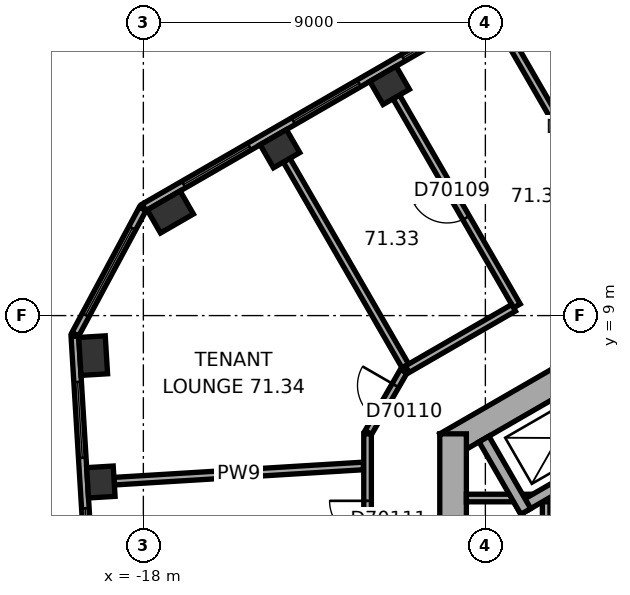
"""IFC4 building model, lengths in metres.
Left out: names, types, materials, properties, quantities, classifications, styles, units other than length and angle.
Written with IfcOpenShell. Run it as: python <this file> out.ifc"""

import sys

from ifc_helpers import new_model, si_unit, direction, frame, frame_2d, origin, origin_2d, place, context, subcontext, project, spatial, rectangle, extrude, element, fill, save


model = new_model("IFC4")
c1 = context("Model", 3, precision=1e-05, world=origin(), true_north=direction((0.0, 1.0)))
c2 = subcontext(c1, "Body", "Model", "MODEL_VIEW")
j1 = project(units=[si_unit("LENGTHUNIT", "METRE"), si_unit("PLANEANGLEUNIT", "RADIAN")], contexts=[c1])
p1 = place(None, origin())
s1 = spatial("IfcSite", under=j1, at=p1, CompositionType="ELEMENT")
p2 = place(p1, origin())
s2 = spatial("IfcBuilding", under=s1, at=p2, CompositionType="ELEMENT")
p3 = place(p2, frame((0.0, 0.0, 289.4)))
s3 = spatial("IfcBuildingStorey", under=s2, at=p3, CompositionType="ELEMENT", Elevation=289.4)
for number, where, z_axis, x_axis in (
    (1, (-11.52, 15.057, 0.0), (0.0, 0.0, 1.0), (-0.866, -0.5, 0.0)),
    (2, (-14.406, 13.391, 0.0), (0.0, 0.0, 1.0), (-0.866, -0.5, 0.0)),
):
    element("IfcColumn", number, at=place(p3, frame(where, z_axis=z_axis, x_axis=x_axis)), inside=s3, PredefinedType="COLUMN", context=c2, shape_type="SweptSolid", body=[
        extrude(rectangle(XDim=0.8, YDim=0.7, at=origin_2d()), origin(), (0.0, 0.0, 1.0), 3.7),
    ])
for number, where, z_axis, x_axis in (
    (3, (-17.291, 11.726, 0.0), (0.0, 0.0, 1.0), (-0.866, -0.5, 0.0)),
    (4, (-19.321, 7.947, 0.0), (0.0, 0.0, 1.0), (0.061, -0.998, 0.0)),
):
    element("IfcColumn", number, at=place(p3, frame(where, z_axis=z_axis, x_axis=x_axis)), inside=s3, PredefinedType="COLUMN", context=c2, shape_type="SweptSolid", body=[
        extrude(rectangle(XDim=1.0, YDim=0.7, at=origin_2d()), origin(), (0.0, 0.0, 1.0), 3.7),
    ])
p4 = place(p3, frame((-19.118, 4.621, 0.0), z_axis=(0.0, 0.0, 1.0), x_axis=(0.061048539535, -0.998134798422, 0.0)))
e5 = element("IfcColumn", 5, at=p4, inside=s3, PredefinedType="COLUMN", context=c2, shape_type="SweptSolid", body=[
    extrude(rectangle(XDim=0.8, YDim=0.7, at=origin_2d()), origin(), (0.0, 0.0, 1.0), 3.7),
])
p5 = place(p3, frame((0.175, 11.475, 0.0), z_axis=(0.0, 0.0, 1.0), x_axis=(-0.866026453023, -0.499998182661, 0.0)))
e6 = element("IfcWall", 6, at=p5, inside=s3, PredefinedType="SHEAR", context=c2, shape_type="SweptSolid", body=[
    extrude(rectangle(XDim=11.778, YDim=0.7, at=frame_2d((5.889, 0.0))), origin(), (0.0, 0.0, 1.0), 3.7),
])
p6 = place(p5, frame((6.089, 0.0, 0.0)))
e7 = element("IfcOpeningElement", 7, at=p6, cuts=e6, PredefinedType="OPENING", context=c2, shape_type="SweptSolid", body=[
    extrude(rectangle(XDim=1.5, YDim=2.1, at=frame_2d((0.75, 1.05))), frame((0.0, 0.36, 0.0), z_axis=(0.0, -1.0, 0.0), x_axis=(1.0, 0.0, 0.0)), (0.0, 0.0, 1.0), 0.72),
])
p7 = place(p5, frame((2.939, 0.0, 0.0)))
e8 = element("IfcOpeningElement", 8, at=p7, cuts=e6, PredefinedType="OPENING", context=c2, shape_type="SweptSolid", body=[
    extrude(rectangle(XDim=0.9, YDim=2.1, at=frame_2d((0.45, 1.05))), frame((0.0, 0.36, 0.0), z_axis=(0.0, -1.0, 0.0), x_axis=(1.0, 0.0, 0.0)), (0.0, 0.0, 1.0), 0.72),
])
p8 = place(p3, frame((-9.85, 5.889, 0.0), z_axis=(0.0, 0.0, 1.0), x_axis=(0.0, -1.0, 0.0)))
e9 = element("IfcWall", 9, at=p8, inside=s3, PredefinedType="SHEAR", context=c2, shape_type="SweptSolid", body=[
    extrude(rectangle(XDim=11.778, YDim=0.7, at=frame_2d((5.889, 0.0))), origin(), (0.0, 0.0, 1.0), 3.7),
])
p9 = place(p8, frame((5.039, 0.0, 0.0)))
e10 = element("IfcOpeningElement", 10, at=p9, cuts=e9, PredefinedType="OPENING", context=c2, shape_type="SweptSolid", body=[
    extrude(rectangle(XDim=1.1, YDim=2.1, at=frame_2d((0.55, 1.05))), frame((0.0, 0.36, 0.0), z_axis=(0.0, -1.0, 0.0), x_axis=(1.0, 0.0, 0.0)), (0.0, 0.0, 1.0), 0.72),
])
p10 = place(p8, frame((7.639, 0.0, 0.0)))
e11 = element("IfcOpeningElement", 11, at=p10, cuts=e9, PredefinedType="OPENING", context=c2, shape_type="SweptSolid", body=[
    extrude(rectangle(XDim=1.1, YDim=2.1, at=frame_2d((0.55, 1.05))), frame((0.0, 0.36, 0.0), z_axis=(0.0, -1.0, 0.0), x_axis=(1.0, 0.0, 0.0)), (0.0, 0.0, 1.0), 0.72),
])
p11 = place(p3, frame((-2.624, 20.713, 0.0), z_axis=(0.0, 0.0, 1.0), x_axis=(-0.866026460444, -0.499998169808, 0.0)))
e12 = element("IfcWall", 12, at=p11, inside=s3, PredefinedType="STANDARD", context=c2, shape_type="SweptSolid", body=[
    extrude(rectangle(XDim=17.731, YDim=0.2, at=frame_2d((8.866, 0.0))), origin(), (0.0, 0.0, 1.0), 3.7),
])
p12 = place(p11, frame((1.203, 0.0, 0.9)))
e13 = element("IfcOpeningElement", 13, at=p12, cuts=e12, PredefinedType="OPENING", context=c2, shape_type="SweptSolid", body=[
    extrude(rectangle(XDim=2.0, YDim=2.0, at=frame_2d((1.0, 1.0))), frame((0.0, 0.11, 0.0), z_axis=(0.0, -1.0, 0.0), x_axis=(1.0, 0.0, 0.0)), (0.0, 0.0, 1.0), 0.22),
])
p13 = place(p11, frame((4.535, 0.0, 0.9)))
e14 = element("IfcOpeningElement", 14, at=p13, cuts=e12, PredefinedType="OPENING", context=c2, shape_type="SweptSolid", body=[
    extrude(rectangle(XDim=2.0, YDim=2.0, at=frame_2d((1.0, 1.0))), frame((0.0, 0.11, 0.0), z_axis=(0.0, -1.0, 0.0), x_axis=(1.0, 0.0, 0.0)), (0.0, 0.0, 1.0), 0.22),
])
p14 = place(p11, frame((7.867, 0.0, 0.9)))
e15 = element("IfcOpeningElement", 15, at=p14, cuts=e12, PredefinedType="OPENING", context=c2, shape_type="SweptSolid", body=[
    extrude(rectangle(XDim=2.0, YDim=2.0, at=frame_2d((1.0, 1.0))), frame((0.0, 0.11, 0.0), z_axis=(0.0, -1.0, 0.0), x_axis=(1.0, 0.0, 0.0)), (0.0, 0.0, 1.0), 0.22),
])
p15 = place(p11, frame((11.198, 0.0, 0.9)))
e16 = element("IfcOpeningElement", 16, at=p15, cuts=e12, PredefinedType="OPENING", context=c2, shape_type="SweptSolid", body=[
    extrude(rectangle(XDim=2.0, YDim=2.0, at=frame_2d((1.0, 1.0))), frame((0.0, 0.11, 0.0), z_axis=(0.0, -1.0, 0.0), x_axis=(1.0, 0.0, 0.0)), (0.0, 0.0, 1.0), 0.22),
])
p16 = place(p11, frame((14.53, 0.0, 0.9)))
e17 = element("IfcOpeningElement", 17, at=p16, cuts=e12, PredefinedType="OPENING", context=c2, shape_type="SweptSolid", body=[
    extrude(rectangle(XDim=2.0, YDim=2.0, at=frame_2d((1.0, 1.0))), frame((0.0, 0.11, 0.0), z_axis=(0.0, -1.0, 0.0), x_axis=(1.0, 0.0, 0.0)), (0.0, 0.0, 1.0), 0.22),
])
p17 = place(p3, frame((-18.018, 11.808, 0.0), z_axis=(0.0, 0.0, 1.0), x_axis=(-0.473318619185, -0.880891301315, 0.0)))
e18 = element("IfcWall", 18, at=p17, inside=s3, PredefinedType="STANDARD", context=c2, shape_type="SweptSolid", body=[
    extrude(rectangle(XDim=3.747, YDim=0.2, at=frame_2d((1.874, 0.0))), origin(), (0.0, 0.0, 1.0), 3.7),
])
p18 = place(p17, frame((0.573, 0.0, 0.9)))
e19 = element("IfcOpeningElement", 19, at=p18, cuts=e18, PredefinedType="OPENING", context=c2, shape_type="SweptSolid", body=[
    extrude(rectangle(XDim=2.6, YDim=2.0, at=frame_2d((1.3, 1.0))), frame((0.0, 0.11, 0.0), z_axis=(0.0, -1.0, 0.0), x_axis=(1.0, 0.0, 0.0)), (0.0, 0.0, 1.0), 0.22),
])
p19 = place(p3, frame((-19.803, 8.454, 0.0), z_axis=(0.0, 0.0, 1.0), x_axis=(0.061036717565, -0.998135521414, 0.0)))
e20 = element("IfcWall", 20, at=p19, inside=s3, PredefinedType="STANDARD", context=c2, shape_type="SweptSolid", body=[
    extrude(rectangle(XDim=17.731, YDim=0.2, at=frame_2d((8.866, 0.0))), origin(), (0.0, 0.0, 1.0), 3.7),
])
p20 = place(p19, frame((1.202, 0.0, 0.9)))
e21 = element("IfcOpeningElement", 21, at=p20, cuts=e20, PredefinedType="OPENING", context=c2, shape_type="SweptSolid", body=[
    extrude(rectangle(XDim=2.0, YDim=2.0, at=frame_2d((1.0, 1.0))), frame((0.0, 0.11, 0.0), z_axis=(0.0, -1.0, 0.0), x_axis=(1.0, 0.0, 0.0)), (0.0, 0.0, 1.0), 0.22),
])
p21 = place(p19, frame((4.533, 0.0, 0.9)))
e22 = element("IfcOpeningElement", 22, at=p21, cuts=e20, PredefinedType="OPENING", context=c2, shape_type="SweptSolid", body=[
    extrude(rectangle(XDim=2.0, YDim=2.0, at=frame_2d((1.0, 1.0))), frame((0.0, 0.11, 0.0), z_axis=(0.0, -1.0, 0.0), x_axis=(1.0, 0.0, 0.0)), (0.0, 0.0, 1.0), 0.22),
])
p22 = place(p19, frame((7.865, 0.0, 0.9)))
e23 = element("IfcOpeningElement", 23, at=p22, cuts=e20, PredefinedType="OPENING", context=c2, shape_type="SweptSolid", body=[
    extrude(rectangle(XDim=2.0, YDim=2.0, at=frame_2d((1.0, 1.0))), frame((0.0, 0.11, 0.0), z_axis=(0.0, -1.0, 0.0), x_axis=(1.0, 0.0, 0.0)), (0.0, 0.0, 1.0), 0.22),
])
p23 = place(p19, frame((11.197, 0.0, 0.9)))
e24 = element("IfcOpeningElement", 24, at=p23, cuts=e20, PredefinedType="OPENING", context=c2, shape_type="SweptSolid", body=[
    extrude(rectangle(XDim=2.0, YDim=2.0, at=frame_2d((1.0, 1.0))), frame((0.0, 0.11, 0.0), z_axis=(0.0, -1.0, 0.0), x_axis=(1.0, 0.0, 0.0)), (0.0, 0.0, 1.0), 0.22),
])
p24 = place(p19, frame((14.528, 0.0, 0.9)))
e25 = element("IfcOpeningElement", 25, at=p24, cuts=e20, PredefinedType="OPENING", context=c2, shape_type="SweptSolid", body=[
    extrude(rectangle(XDim=2.0, YDim=2.0, at=frame_2d((1.0, 1.0))), frame((0.0, 0.11, 0.0), z_axis=(0.0, -1.0, 0.0), x_axis=(1.0, 0.0, 0.0)), (0.0, 0.0, 1.0), 0.22),
])
p25 = place(p3, frame((-7.4, 4.3, 0.0), z_axis=(0.0, 0.0, 1.0), x_axis=(0.0, -1.0, 0.0)))
e26 = element("IfcWall", 26, at=p25, inside=s3, PredefinedType="PARTITIONING", context=c2, shape_type="SweptSolid", body=[
    extrude(rectangle(XDim=8.0, YDim=0.2, at=frame_2d((4.0, 0.0))), origin(), (0.0, 0.0, 1.0), 3.42),
])
p26 = place(p3, frame((-7.3, 4.2, 0.0), z_axis=(0.0, 0.0, 1.0), x_axis=(-1.0, 0.0, 0.0)))
e27 = element("IfcWall", 27, at=p26, inside=s3, PredefinedType="PARTITIONING", context=c2, shape_type="SweptSolid", body=[
    extrude(rectangle(XDim=2.2, YDim=0.2, at=frame_2d((1.1, 0.0))), origin(), (0.0, 0.0, 1.0), 3.42),
])
p27 = place(p3, frame((-5.24, 5.577, 0.0), z_axis=(0.0, 0.0, 1.0), x_axis=(-0.866014461049, -0.500018952895, 0.0)))
e28 = element("IfcWall", 28, at=p27, inside=s3, PredefinedType="SHEAR", context=c2, shape_type="SweptSolid", body=[
    extrude(rectangle(XDim=3.35, YDim=0.3, at=frame_2d((1.675, 0.0))), origin(), (0.0, 0.0, 1.0), 3.42),
])
p28 = place(p3, frame((-7.937, 3.847, 0.0), z_axis=(0.0, 0.0, 1.0), x_axis=(-0.50002983664, 0.866008176907, 0.0)))
e29 = element("IfcWall", 29, at=p28, inside=s3, PredefinedType="SHEAR", context=c2, shape_type="SweptSolid", body=[
    extrude(rectangle(XDim=2.2, YDim=0.3, at=frame_2d((1.1, 0.0))), origin(), (0.0, 0.0, 1.0), 3.42),
])
p29 = place(p3, frame((-18.768, 4.643, 0.0), z_axis=(0.0, 0.0, 1.0), x_axis=(0.99813496285, 0.0610458511, 0.0)))
e30 = element("IfcWall", 30, at=p29, inside=s3, PredefinedType="PARTITIONING", context=c2, shape_type="SweptSolid", body=[
    extrude(rectangle(XDim=6.571, YDim=0.2, at=frame_2d((3.285, 0.0))), origin(), (0.0, 0.0, 1.0), 3.42),
])
p30 = place(p3, frame((-14.23, 13.088, 0.0), z_axis=(0.0, 0.0, 1.0), x_axis=(0.500004234368, -0.866022959057, 0.0)))
e31 = element("IfcWall", 31, at=p30, inside=s3, PredefinedType="PARTITIONING", context=c2, shape_type="SweptSolid", body=[
    extrude(rectangle(XDim=6.25, YDim=0.2, at=frame_2d((3.125, 0.0))), origin(), (0.0, 0.0, 1.0), 3.42),
])
p31 = place(p3, frame((-12.1, 5.889, 0.0), z_axis=(0.0, 0.0, 1.0), x_axis=(0.0, -1.0, 0.0)))
e32 = element("IfcWall", 32, at=p31, inside=s3, PredefinedType="PARTITIONING", context=c2, shape_type="SweptSolid", body=[
    extrude(rectangle(XDim=3.688, YDim=0.2, at=frame_2d((1.844, 0.0))), origin(), (0.0, 0.0, 1.0), 3.42),
])
p32 = place(p31, frame((1.763, 0.0, 0.0)))
e33 = element("IfcOpeningElement", 33, at=p32, cuts=e32, PredefinedType="OPENING", context=c2, shape_type="SweptSolid", body=[
    extrude(rectangle(XDim=1.0, YDim=2.1, at=frame_2d((0.5, 1.05))), frame((0.0, 0.11, 0.0), z_axis=(0.0, -1.0, 0.0), x_axis=(1.0, 0.0, 0.0)), (0.0, 0.0, 1.0), 0.22),
])
p33 = place(p3, frame((-11.345, 14.754, 0.0), z_axis=(0.0, 0.0, 1.0), x_axis=(0.500005339912, -0.866022320763, 0.0)))
e34 = element("IfcWall", 34, at=p33, inside=s3, PredefinedType="PARTITIONING", context=c2, shape_type="SweptSolid", body=[
    extrude(rectangle(XDim=6.35, YDim=0.2, at=frame_2d((3.175, 0.0))), origin(), (0.0, 0.0, 1.0), 3.42),
])
p34 = place(p33, frame((2.675, 0.0, 0.0)))
e35 = element("IfcOpeningElement", 35, at=p34, cuts=e34, PredefinedType="OPENING", context=c2, shape_type="SweptSolid", body=[
    extrude(rectangle(XDim=1.0, YDim=2.1, at=frame_2d((0.5, 1.05))), frame((0.0, 0.11, 0.0), z_axis=(0.0, -1.0, 0.0), x_axis=(1.0, 0.0, 0.0)), (0.0, 0.0, 1.0), 0.22),
])
p35 = place(p3, frame((-11.15, 7.534, 0.0), z_axis=(0.0, 0.0, 1.0), x_axis=(-0.500063286585, -0.865988862174, 0.0)))
e36 = element("IfcWall", 36, at=p35, inside=s3, PredefinedType="PARTITIONING", context=c2, shape_type="SweptSolid", body=[
    extrude(rectangle(XDim=1.86, YDim=0.2, at=frame_2d((0.93, 0.0))), origin(), (0.0, 0.0, 1.0), 3.42),
])
p36 = place(p35, frame((0.43, 0.0, 0.0)))
e37 = element("IfcOpeningElement", 37, at=p36, cuts=e36, PredefinedType="OPENING", context=c2, shape_type="SweptSolid", body=[
    extrude(rectangle(XDim=1.0, YDim=2.1, at=frame_2d((0.5, 1.05))), frame((0.0, 0.11, 0.0), z_axis=(0.0, -1.0, 0.0), x_axis=(1.0, 0.0, 0.0)), (0.0, 0.0, 1.0), 0.22),
])
p37 = place(p3, frame((-8.46, 16.42, 0.0), z_axis=(0.0, 0.0, 1.0), x_axis=(0.500005339912, -0.866022320763, 0.0)))
e38 = element("IfcWall", 38, at=p37, inside=s3, PredefinedType="PARTITIONING", context=c2, shape_type="SweptSolid", body=[
    extrude(rectangle(XDim=6.35, YDim=0.2, at=frame_2d((3.175, 0.0))), origin(), (0.0, 0.0, 1.0), 2.87),
])
p38 = place(p37, frame((2.675, 0.0, 0.0)))
e39 = element("IfcOpeningElement", 39, at=p38, cuts=e38, PredefinedType="OPENING", context=c2, shape_type="SweptSolid", body=[
    extrude(rectangle(XDim=1.0, YDim=2.1, at=frame_2d((0.5, 1.05))), frame((0.0, 0.11, 0.0), z_axis=(0.0, -1.0, 0.0), x_axis=(1.0, 0.0, 0.0)), (0.0, 0.0, 1.0), 0.22),
])
p39 = place(p3, frame((-8.257, 9.205, 0.0), z_axis=(0.0, 0.0, 1.0), x_axis=(-0.866030838723, -0.499990586292, 0.0)))
e40 = element("IfcWall", 40, at=p39, inside=s3, PredefinedType="PARTITIONING", context=c2, shape_type="SweptSolid", body=[
    extrude(rectangle(XDim=3.231, YDim=0.2, at=frame_2d((1.616, 0.0))), origin(), (0.0, 0.0, 1.0), 3.42),
])
p40 = place(p14, origin())
e41 = element("IfcWindow", 41, at=p40, inside=s3, PartitioningType="SINGLE_PANEL", PredefinedType="WINDOW", context=c2, shape_type="SweptSolid", body=[
    extrude(rectangle(XDim=2.0, YDim=2.0, at=frame_2d((1.0, 1.0))), frame((0.0, 0.03, 0.0), z_axis=(0.0, -1.0, 0.0), x_axis=(1.0, 0.0, 0.0)), (0.0, 0.0, 1.0), 0.06),
])
fill(e15, e41)
p41 = place(p15, origin())
e42 = element("IfcWindow", 42, at=p41, inside=s3, PartitioningType="SINGLE_PANEL", PredefinedType="WINDOW", context=c2, shape_type="SweptSolid", body=[
    extrude(rectangle(XDim=2.0, YDim=2.0, at=frame_2d((1.0, 1.0))), frame((0.0, 0.03, 0.0), z_axis=(0.0, -1.0, 0.0), x_axis=(1.0, 0.0, 0.0)), (0.0, 0.0, 1.0), 0.06),
])
fill(e16, e42)
p42 = place(p16, origin())
e43 = element("IfcWindow", 43, at=p42, inside=s3, PartitioningType="SINGLE_PANEL", PredefinedType="WINDOW", context=c2, shape_type="SweptSolid", body=[
    extrude(rectangle(XDim=2.0, YDim=2.0, at=frame_2d((1.0, 1.0))), frame((0.0, 0.03, 0.0), z_axis=(0.0, -1.0, 0.0), x_axis=(1.0, 0.0, 0.0)), (0.0, 0.0, 1.0), 0.06),
])
fill(e17, e43)
p43 = place(p18, origin())
e44 = element("IfcWindow", 44, at=p43, inside=s3, PartitioningType="SINGLE_PANEL", PredefinedType="WINDOW", context=c2, shape_type="SweptSolid", body=[
    extrude(rectangle(XDim=2.6, YDim=2.0, at=frame_2d((1.3, 1.0))), frame((0.0, 0.03, 0.0), z_axis=(0.0, -1.0, 0.0), x_axis=(1.0, 0.0, 0.0)), (0.0, 0.0, 1.0), 0.06),
])
fill(e19, e44)
p44 = place(p20, origin())
e45 = element("IfcWindow", 45, at=p44, inside=s3, PartitioningType="SINGLE_PANEL", PredefinedType="WINDOW", context=c2, shape_type="SweptSolid", body=[
    extrude(rectangle(XDim=2.0, YDim=2.0, at=frame_2d((1.0, 1.0))), frame((0.0, 0.03, 0.0), z_axis=(0.0, -1.0, 0.0), x_axis=(1.0, 0.0, 0.0)), (0.0, 0.0, 1.0), 0.06),
])
fill(e21, e45)
p45 = place(p21, origin())
e46 = element("IfcWindow", 46, at=p45, inside=s3, PartitioningType="SINGLE_PANEL", PredefinedType="WINDOW", context=c2, shape_type="SweptSolid", body=[
    extrude(rectangle(XDim=2.0, YDim=2.0, at=frame_2d((1.0, 1.0))), frame((0.0, 0.03, 0.0), z_axis=(0.0, -1.0, 0.0), x_axis=(1.0, 0.0, 0.0)), (0.0, 0.0, 1.0), 0.06),
])
fill(e22, e46)
p46 = place(p34, origin())
e47 = element("IfcDoor", 47, at=p46, inside=s3, OperationType="SINGLE_SWING_LEFT", PredefinedType="DOOR", context=c2, shape_type="SweptSolid", body=[
    extrude(rectangle(XDim=1.0, YDim=2.1, at=frame_2d((0.5, 1.05))), frame((0.0, 0.025, 0.0), z_axis=(0.0, -1.0, 0.0), x_axis=(1.0, 0.0, 0.0)), (0.0, 0.0, 1.0), 0.05),
])
fill(e35, e47)
p47 = place(p36, origin())
e48 = element("IfcDoor", 48, at=p47, inside=s3, OperationType="SINGLE_SWING_LEFT", PredefinedType="DOOR", context=c2, shape_type="SweptSolid", body=[
    extrude(rectangle(XDim=1.0, YDim=2.1, at=frame_2d((0.5, 1.05))), frame((0.0, 0.025, 0.0), z_axis=(0.0, -1.0, 0.0), x_axis=(1.0, 0.0, 0.0)), (0.0, 0.0, 1.0), 0.05),
])
fill(e37, e48)
p48 = place(p32, origin())
e49 = element("IfcDoor", 49, at=p48, inside=s3, OperationType="SINGLE_SWING_LEFT", PredefinedType="DOOR", context=c2, shape_type="SweptSolid", body=[
    extrude(rectangle(XDim=1.0, YDim=2.1, at=frame_2d((0.5, 1.05))), frame((0.0, 0.025, 0.0), z_axis=(0.0, -1.0, 0.0), x_axis=(1.0, 0.0, 0.0)), (0.0, 0.0, 1.0), 0.05),
])
fill(e33, e49)
save(model, sys.argv[1])
